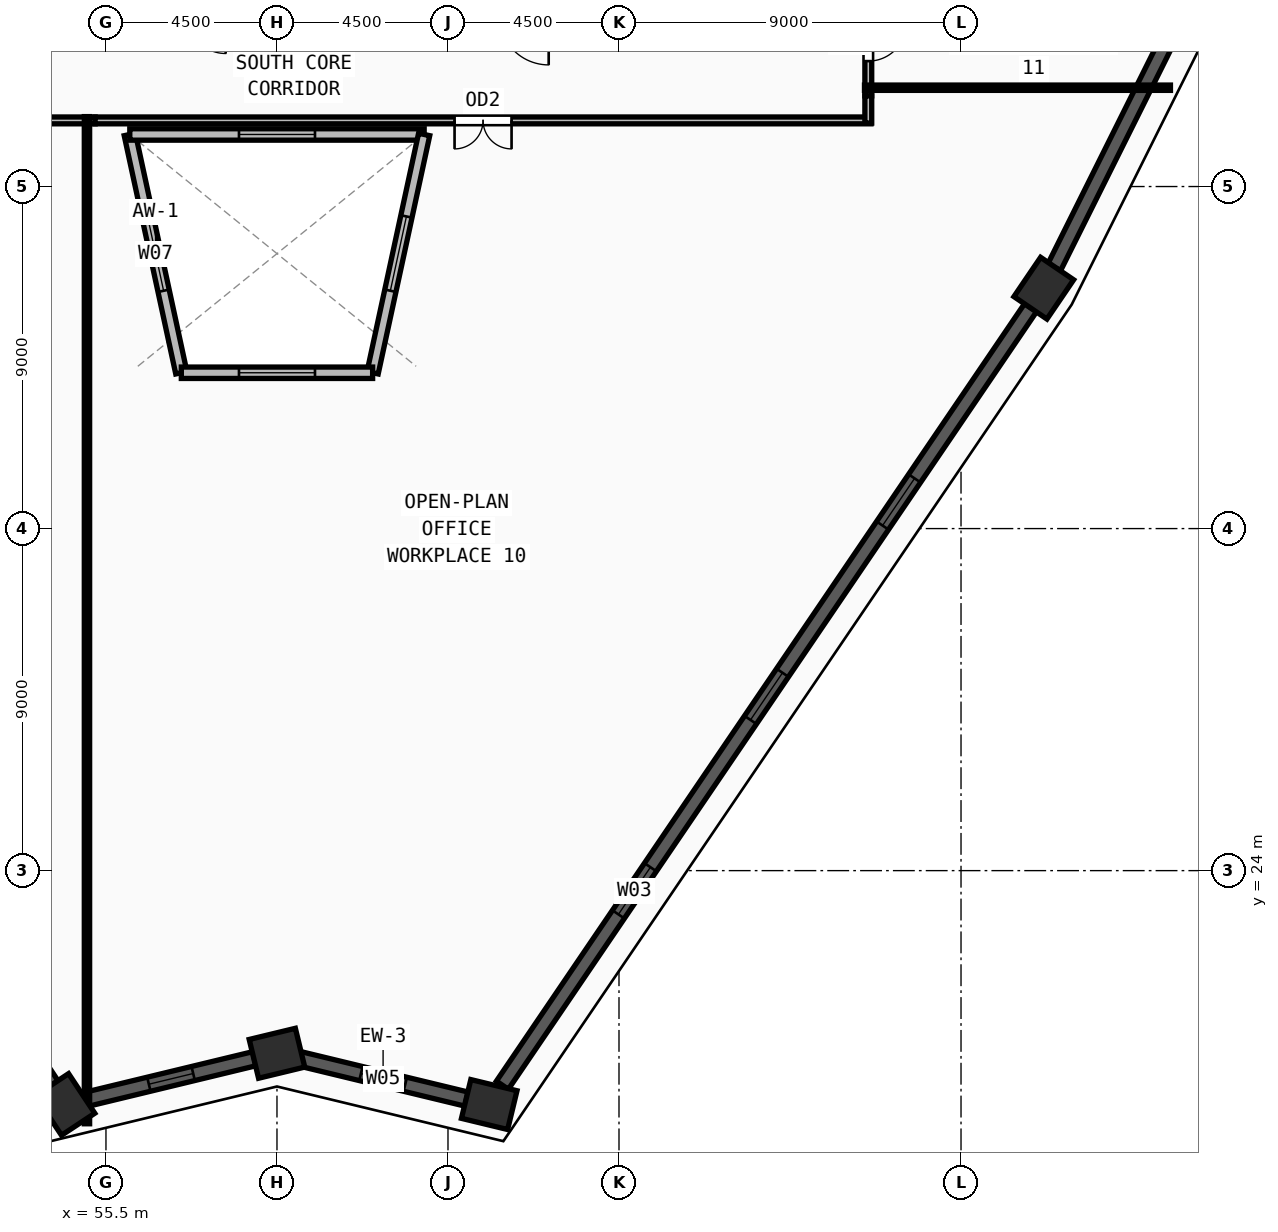
"""IFC4 building model, lengths in metres.
Left out: names, types, materials, properties, quantities, classifications, styles, units other than length and angle.
Written with IfcOpenShell. Run it as: python <this file> out.ifc"""

import sys

from ifc_helpers import new_model, si_unit, direction, frame, frame_2d, origin, origin_2d, place, context, subcontext, project, spatial, rectangle, extrude, source, transform, mapped, element, fill, save


model = new_model("IFC4")
c1 = context("Model", 3, precision=1e-05, world=origin(), true_north=direction((0.0, 1.0)))
c2 = subcontext(c1, "Body", "Model", "MODEL_VIEW")
j1 = project(units=[si_unit("LENGTHUNIT", "METRE"), si_unit("PLANEANGLEUNIT", "RADIAN")], contexts=[c1])
p1 = place(None, origin())
s1 = spatial("IfcSite", under=j1, at=p1, CompositionType="ELEMENT")
p2 = place(p1, origin())
s2 = spatial("IfcBuilding", under=s1, at=p2, CompositionType="ELEMENT")
p3 = place(p2, frame((0.0, 0.0, 194.25)))
s3 = spatial("IfcBuildingStorey", under=s2, at=p3, CompositionType="ELEMENT", Elevation=194.25)
m1 = source(origin(), c2, "Body", "SweptSolid", [
    extrude(rectangle(XDim=1.25, YDim=1.05, at=origin_2d()), origin(), (0.0, 0.0, 1.0), 3.75),
])
for number, where, z_axis, x_axis in (
    (1, (54.423, 17.847, 0.0), (0.0, 0.0, 1.0), (-0.552, 0.834, 0.0)),
    (2, (80.178, 39.325, 0.0), (0.0, 0.0, 1.0), (0.562, 0.827, 0.0)),
    (3, (65.585, 17.845, 0.0), (0.0, 0.0, 1.0), (-0.972, 0.235, 0.0)),
    (4, (60.0, 19.194, 0.0), (0.0, 0.0, 1.0), (0.972, 0.235, 0.0)),
):
    element("IfcColumn", number, at=place(p3, frame(where, z_axis=z_axis, x_axis=x_axis)), inside=s3, PredefinedType="COLUMN", context=c2, shape_type="MappedRepresentation", body=[
        mapped(m1, transform((0.0, 0.0, 0.0), x_axis=(1.0, 0.0, 0.0), y_axis=(0.0, 1.0, 0.0), z_axis=(0.0, 0.0, 1.0), scale=1.0)),
    ])
p4 = place(p3, frame((60.598, 19.05, 0.0), z_axis=(0.0, 0.0, 1.0), x_axis=(0.972002207068, -0.234971720543, 0.0)))
e5 = element("IfcWall", 5, at=p4, inside=s3, PredefinedType="SOLIDWALL", context=c2, shape_type="SweptSolid", body=[
    extrude(rectangle(XDim=4.516, YDim=0.38, at=frame_2d((2.258, 0.0))), origin(), (0.0, 0.0, 1.0), 3.57),
])
m2 = source(origin(), c2, "Body", "SweptSolid", [
    extrude(rectangle(XDim=1.2, YDim=1.9, at=frame_2d((0.6, 0.95))), frame((0.0, 0.2, 0.0), z_axis=(0.0, -1.0, 0.0), x_axis=(1.0, 0.0, 0.0)), (0.0, 0.0, 1.0), 0.4),
])
p5 = place(p4, frame((1.658, 0.0, 0.55)))
e6 = element("IfcOpeningElement", 6, at=p5, cuts=e5, PredefinedType="OPENING", context=c2, shape_type="MappedRepresentation", body=[
    mapped(m2, transform((0.0, 0.0, 0.0), x_axis=(1.0, 0.0, 0.0), y_axis=(0.0, 1.0, 0.0), z_axis=(0.0, 0.0, 1.0), scale=1.0)),
])
p6 = place(p3, frame((65.931, 18.354, 0.0), z_axis=(0.0, 0.0, 1.0), x_axis=(0.561951205554, 0.827170383039, 0.0)))
e7 = element("IfcWall", 7, at=p6, inside=s3, PredefinedType="SOLIDWALL", context=c2, shape_type="SweptSolid", body=[
    extrude(rectangle(XDim=24.737, YDim=0.38, at=frame_2d((12.369, 0.0))), origin(), (0.0, 0.0, 1.0), 3.57),
])
m3 = source(origin(), c2, "Body", "SweptSolid", [
    extrude(rectangle(XDim=1.5, YDim=1.9, at=frame_2d((0.75, 0.95))), frame((0.0, 0.2, 0.0), z_axis=(0.0, -1.0, 0.0), x_axis=(1.0, 0.0, 0.0)), (0.0, 0.0, 1.0), 0.4),
])
p7 = place(p6, frame((5.434, 0.0, 0.55)))
e8 = element("IfcOpeningElement", 8, at=p7, cuts=e7, PredefinedType="OPENING", context=c2, shape_type="MappedRepresentation", body=[
    mapped(m3, transform((0.0, 0.0, 0.0), x_axis=(1.0, 0.0, 0.0), y_axis=(0.0, 1.0, 0.0), z_axis=(0.0, 0.0, 1.0), scale=1.0)),
])
p8 = place(p6, frame((11.619, 0.0, 0.55)))
e9 = element("IfcOpeningElement", 9, at=p8, cuts=e7, PredefinedType="OPENING", context=c2, shape_type="MappedRepresentation", body=[
    mapped(m3, transform((0.0, 0.0, 0.0), x_axis=(1.0, 0.0, 0.0), y_axis=(0.0, 1.0, 0.0), z_axis=(0.0, 0.0, 1.0), scale=1.0)),
])
p9 = place(p6, frame((17.803, 0.0, 0.55)))
e10 = element("IfcOpeningElement", 10, at=p9, cuts=e7, PredefinedType="OPENING", context=c2, shape_type="MappedRepresentation", body=[
    mapped(m3, transform((0.0, 0.0, 0.0), x_axis=(1.0, 0.0, 0.0), y_axis=(0.0, 1.0, 0.0), z_axis=(0.0, 0.0, 1.0), scale=1.0)),
])
p10 = place(p3, frame((80.452, 39.875, 0.0), z_axis=(0.0, 0.0, 1.0), x_axis=(0.446173861236, 0.894946303166, 0.0)))
e11 = element("IfcWall", 11, at=p10, inside=s3, PredefinedType="SOLIDWALL", context=c2, shape_type="SweptSolid", body=[
    extrude(rectangle(XDim=29.97, YDim=0.38, at=frame_2d((14.985, 0.0))), origin(), (0.0, 0.0, 1.0), 3.57),
])
p11 = place(p10, frame((8.943, 0.0, 0.55)))
e12 = element("IfcOpeningElement", 12, at=p11, cuts=e11, PredefinedType="OPENING", context=c2, shape_type="MappedRepresentation", body=[
    mapped(m3, transform((0.0, 0.0, 0.0), x_axis=(1.0, 0.0, 0.0), y_axis=(0.0, 1.0, 0.0), z_axis=(0.0, 0.0, 1.0), scale=1.0)),
])
p12 = place(p10, frame((14.235, 0.0, 0.55)))
e13 = element("IfcOpeningElement", 13, at=p12, cuts=e11, PredefinedType="OPENING", context=c2, shape_type="MappedRepresentation", body=[
    mapped(m3, transform((0.0, 0.0, 0.0), x_axis=(1.0, 0.0, 0.0), y_axis=(0.0, 1.0, 0.0), z_axis=(0.0, 0.0, 1.0), scale=1.0)),
])
p13 = place(p10, frame((21.728, 0.0, 0.55)))
e14 = element("IfcOpeningElement", 14, at=p13, cuts=e11, PredefinedType="OPENING", context=c2, shape_type="MappedRepresentation", body=[
    mapped(m3, transform((0.0, 0.0, 0.0), x_axis=(1.0, 0.0, 0.0), y_axis=(0.0, 1.0, 0.0), z_axis=(0.0, 0.0, 1.0), scale=1.0)),
])
p14 = place(p3, frame((37.541, 43.351, 0.0), z_axis=(0.0, 0.0, 1.0), x_axis=(0.551978948994, -0.833858045394, 0.0)))
e15 = element("IfcWall", 15, at=p14, inside=s3, PredefinedType="SOLIDWALL", context=c2, shape_type="SweptSolid", body=[
    extrude(rectangle(XDim=29.97, YDim=0.38, at=frame_2d((14.985, 0.0))), origin(), (0.0, 0.0, 1.0), 3.57),
])
p15 = place(p14, frame((6.743, 0.0, 0.55)))
e16 = element("IfcOpeningElement", 16, at=p15, cuts=e15, PredefinedType="OPENING", context=c2, shape_type="MappedRepresentation", body=[
    mapped(m3, transform((0.0, 0.0, 0.0), x_axis=(1.0, 0.0, 0.0), y_axis=(0.0, 1.0, 0.0), z_axis=(0.0, 0.0, 1.0), scale=1.0)),
])
p16 = place(p14, frame((14.235, 0.0, 0.55)))
e17 = element("IfcOpeningElement", 17, at=p16, cuts=e15, PredefinedType="OPENING", context=c2, shape_type="MappedRepresentation", body=[
    mapped(m3, transform((0.0, 0.0, 0.0), x_axis=(1.0, 0.0, 0.0), y_axis=(0.0, 1.0, 0.0), z_axis=(0.0, 0.0, 1.0), scale=1.0)),
])
p17 = place(p14, frame((21.728, 0.0, 0.55)))
e18 = element("IfcOpeningElement", 18, at=p17, cuts=e15, PredefinedType="OPENING", context=c2, shape_type="MappedRepresentation", body=[
    mapped(m3, transform((0.0, 0.0, 0.0), x_axis=(1.0, 0.0, 0.0), y_axis=(0.0, 1.0, 0.0), z_axis=(0.0, 0.0, 1.0), scale=1.0)),
])
p18 = place(p3, frame((55.021, 17.991, 0.0), z_axis=(0.0, 0.0, 1.0), x_axis=(0.972002486445, 0.234970564848, 0.0)))
e19 = element("IfcWall", 19, at=p18, inside=s3, PredefinedType="SOLIDWALL", context=c2, shape_type="SweptSolid", body=[
    extrude(rectangle(XDim=4.507, YDim=0.38, at=frame_2d((2.254, 0.0))), origin(), (0.0, 0.0, 1.0), 3.57),
])
p19 = place(p18, frame((1.654, 0.0, 0.55)))
e20 = element("IfcOpeningElement", 20, at=p19, cuts=e19, PredefinedType="OPENING", context=c2, shape_type="MappedRepresentation", body=[
    mapped(m2, transform((0.0, 0.0, 0.0), x_axis=(1.0, 0.0, 0.0), y_axis=(0.0, 1.0, 0.0), z_axis=(0.0, 0.0, 1.0), scale=1.0)),
])
p20 = place(p3, frame((57.483, 37.1, 0.0), z_axis=(0.0, 0.0, 1.0), x_axis=(-0.211374063876, 0.977405240993, 0.0)))
e21 = element("IfcWall", 21, at=p20, inside=s3, PredefinedType="SOLIDWALL", context=c2, shape_type="SweptSolid", body=[
    extrude(rectangle(XDim=6.415, YDim=0.3, at=frame_2d((3.208, 0.0))), origin(), (0.0, 0.0, 1.0), 3.57),
])
m4 = source(origin(), c2, "Body", "SweptSolid", [
    extrude(rectangle(XDim=2.0, YDim=1.9, at=frame_2d((1.0, 0.95))), frame((0.0, 0.16, 0.0), z_axis=(0.0, -1.0, 0.0), x_axis=(1.0, 0.0, 0.0)), (0.0, 0.0, 1.0), 0.32),
])
p21 = place(p20, frame((2.207, 0.0, 0.55)))
e22 = element("IfcOpeningElement", 22, at=p21, cuts=e21, PredefinedType="OPENING", context=c2, shape_type="MappedRepresentation", body=[
    mapped(m4, transform((0.0, 0.0, 0.0), x_axis=(1.0, 0.0, 0.0), y_axis=(0.0, 1.0, 0.0), z_axis=(0.0, 0.0, 1.0), scale=1.0)),
])
p22 = place(p3, frame((56.127, 43.37, 0.0), z_axis=(0.0, 0.0, 1.0), x_axis=(1.0, 0.0, 0.0)))
e23 = element("IfcWall", 23, at=p22, inside=s3, PredefinedType="SOLIDWALL", context=c2, shape_type="SweptSolid", body=[
    extrude(rectangle(XDim=7.746, YDim=0.3, at=frame_2d((3.873, 0.0))), origin(), (0.0, 0.0, 1.0), 3.57),
])
p23 = place(p22, frame((2.873, 0.0, 0.55)))
e24 = element("IfcOpeningElement", 24, at=p23, cuts=e23, PredefinedType="OPENING", context=c2, shape_type="MappedRepresentation", body=[
    mapped(m4, transform((0.0, 0.0, 0.0), x_axis=(1.0, 0.0, 0.0), y_axis=(0.0, 1.0, 0.0), z_axis=(0.0, 0.0, 1.0), scale=1.0)),
])
p24 = place(p3, frame((63.873, 43.37, 0.0), z_axis=(0.0, 0.0, 1.0), x_axis=(-0.211374063876, -0.977405240993, 0.0)))
e25 = element("IfcWall", 25, at=p24, inside=s3, PredefinedType="SOLIDWALL", context=c2, shape_type="SweptSolid", body=[
    extrude(rectangle(XDim=6.415, YDim=0.3, at=frame_2d((3.208, 0.0))), origin(), (0.0, 0.0, 1.0), 3.57),
])
p25 = place(p24, frame((2.207, 0.0, 0.55)))
e26 = element("IfcOpeningElement", 26, at=p25, cuts=e25, PredefinedType="OPENING", context=c2, shape_type="MappedRepresentation", body=[
    mapped(m4, transform((0.0, 0.0, 0.0), x_axis=(1.0, 0.0, 0.0), y_axis=(0.0, 1.0, 0.0), z_axis=(0.0, 0.0, 1.0), scale=1.0)),
])
p26 = place(p3, frame((62.517, 37.1, 0.0), z_axis=(0.0, 0.0, 1.0), x_axis=(-1.0, 0.0, 0.0)))
e27 = element("IfcWall", 27, at=p26, inside=s3, PredefinedType="SOLIDWALL", context=c2, shape_type="SweptSolid", body=[
    extrude(rectangle(XDim=5.034, YDim=0.3, at=frame_2d((2.517, 0.0))), origin(), (0.0, 0.0, 1.0), 3.57),
])
p27 = place(p26, frame((1.517, 0.0, 0.55)))
e28 = element("IfcOpeningElement", 28, at=p27, cuts=e27, PredefinedType="OPENING", context=c2, shape_type="MappedRepresentation", body=[
    mapped(m4, transform((0.0, 0.0, 0.0), x_axis=(1.0, 0.0, 0.0), y_axis=(0.0, 1.0, 0.0), z_axis=(0.0, 0.0, 1.0), scale=1.0)),
])
p28 = place(p3, frame((55.215, 43.74, 0.0), z_axis=(0.0, 0.0, 1.0), x_axis=(-1.0, 0.0, 0.0)))
e29 = element("IfcWall", 29, at=p28, inside=s3, PredefinedType="PARTITIONING", context=c2, shape_type="SweptSolid", body=[
    extrude(rectangle(XDim=10.845, YDim=0.18, at=frame_2d((5.422, 0.0))), origin(), (0.0, 0.0, 1.0), 3.57),
])
m5 = source(origin(), c2, "Body", "SweptSolid", [
    extrude(rectangle(XDim=1.5, YDim=2.2, at=frame_2d((0.75, 1.1))), frame((0.0, 0.1, 0.0), z_axis=(0.0, -1.0, 0.0), x_axis=(1.0, 0.0, 0.0)), (0.0, 0.0, 1.0), 0.2),
])
p29 = place(p28, frame((4.673, 0.0, 0.0)))
e30 = element("IfcOpeningElement", 30, at=p29, cuts=e29, PredefinedType="OPENING", context=c2, shape_type="MappedRepresentation", body=[
    mapped(m5, transform((0.0, 0.0, 0.0), x_axis=(1.0, 0.0, 0.0), y_axis=(0.0, 1.0, 0.0), z_axis=(0.0, 0.0, 1.0), scale=1.0)),
])
p30 = place(p3, frame((75.63, 43.74, 0.0), z_axis=(0.0, 0.0, 1.0), x_axis=(-1.0, 0.0, 0.0)))
e31 = element("IfcWall", 31, at=p30, inside=s3, PredefinedType="PARTITIONING", context=c2, shape_type="SweptSolid", body=[
    extrude(rectangle(XDim=20.415, YDim=0.18, at=frame_2d((10.208, 0.0))), origin(), (0.0, 0.0, 1.0), 3.57),
])
p31 = place(p30, frame((9.457, 0.0, 0.0)))
e32 = element("IfcOpeningElement", 32, at=p31, cuts=e31, PredefinedType="OPENING", context=c2, shape_type="MappedRepresentation", body=[
    mapped(m5, transform((0.0, 0.0, 0.0), x_axis=(1.0, 0.0, 0.0), y_axis=(0.0, 1.0, 0.0), z_axis=(0.0, 0.0, 1.0), scale=1.0)),
])
p32 = place(p3, frame((75.56, 47.215, 0.0), z_axis=(0.0, 0.0, 1.0), x_axis=(0.0, -1.0, 0.0)))
e33 = element("IfcWall", 33, at=p32, inside=s3, PredefinedType="PARTITIONING", context=c2, shape_type="SweptSolid", body=[
    extrude(rectangle(XDim=2.83, YDim=0.18, at=frame_2d((1.415, 0.0))), origin(), (0.0, 0.0, 1.0), 3.57),
])
m6 = source(origin(), c2, "Body", "SweptSolid", [
    extrude(rectangle(XDim=1.0, YDim=2.2, at=frame_2d((0.5, 1.1))), frame((0.0, 0.1, 0.0), z_axis=(0.0, -1.0, 0.0), x_axis=(1.0, 0.0, 0.0)), (0.0, 0.0, 1.0), 0.2),
])
p33 = place(p32, frame((0.915, 0.0, 0.0)))
e34 = element("IfcOpeningElement", 34, at=p33, cuts=e33, PredefinedType="OPENING", context=c2, shape_type="MappedRepresentation", body=[
    mapped(m6, transform((0.0, 0.0, 0.0), x_axis=(1.0, 0.0, 0.0), y_axis=(0.0, 1.0, 0.0), z_axis=(0.0, 0.0, 1.0), scale=1.0)),
])
p34 = place(p3, frame((75.56, 44.385, 0.0), z_axis=(0.0, 0.0, 1.0), x_axis=(0.0, -1.0, 0.0)))
e35 = element("IfcWall", 35, at=p34, inside=s3, PredefinedType="PARTITIONING", context=c2, shape_type="SweptSolid", body=[
    extrude(rectangle(XDim=0.715, YDim=0.18, at=frame_2d((0.357, 0.0))), origin(), (0.0, 0.0, 1.0), 3.57),
])
p35 = place(p3, frame((75.46, 44.6, 0.0), z_axis=(0.0, 0.0, 1.0), x_axis=(1.0, 0.0, 0.0)))
e36 = element("IfcWall", 36, at=p35, inside=s3, PredefinedType="PARTITIONING", context=c2, shape_type="SweptSolid", body=[
    extrude(rectangle(XDim=8.051, YDim=0.14, at=frame_2d((4.025, 0.0))), origin(), (0.0, 0.0, 1.0), 3.57),
])
p36 = place(p3, frame((55.0, 43.84, 0.0), z_axis=(0.0, 0.0, 1.0), x_axis=(0.0, -1.0, 0.0)))
e37 = element("IfcWall", 37, at=p36, inside=s3, PredefinedType="PARTITIONING", context=c2, shape_type="SweptSolid", body=[
    extrude(rectangle(XDim=26.501, YDim=0.14, at=frame_2d((13.25, 0.0))), origin(), (0.0, 0.0, 1.0), 3.57),
])
m7 = source(origin(), c2, "Body", "SweptSolid", [
    extrude(rectangle(XDim=1.2, YDim=1.9, at=frame_2d((0.6, 0.95))), frame((0.0, 0.03, 0.0), z_axis=(0.0, -1.0, 0.0), x_axis=(1.0, 0.0, 0.0)), (0.0, 0.0, 1.0), 0.06),
])
p37 = place(p5, origin())
e38 = element("IfcWindow", 38, at=p37, inside=s3, PartitioningType="SINGLE_PANEL", PredefinedType="WINDOW", context=c2, shape_type="MappedRepresentation", body=[
    mapped(m7, transform((0.0, 0.0, 0.0), x_axis=(1.0, 0.0, 0.0), y_axis=(0.0, 1.0, 0.0), z_axis=(0.0, 0.0, 1.0), scale=1.0)),
])
fill(e6, e38)
m8 = source(origin(), c2, "Body", "SweptSolid", [
    extrude(rectangle(XDim=1.5, YDim=1.9, at=frame_2d((0.75, 0.95))), frame((0.0, 0.03, 0.0), z_axis=(0.0, -1.0, 0.0), x_axis=(1.0, 0.0, 0.0)), (0.0, 0.0, 1.0), 0.06),
])
p38 = place(p7, origin())
e39 = element("IfcWindow", 39, at=p38, inside=s3, PartitioningType="DOUBLE_PANEL_VERTICAL", PredefinedType="WINDOW", context=c2, shape_type="MappedRepresentation", body=[
    mapped(m8, transform((0.0, 0.0, 0.0), x_axis=(1.0, 0.0, 0.0), y_axis=(0.0, 1.0, 0.0), z_axis=(0.0, 0.0, 1.0), scale=1.0)),
])
fill(e8, e39)
p39 = place(p8, origin())
e40 = element("IfcWindow", 40, at=p39, inside=s3, PartitioningType="DOUBLE_PANEL_VERTICAL", PredefinedType="WINDOW", context=c2, shape_type="MappedRepresentation", body=[
    mapped(m8, transform((0.0, 0.0, 0.0), x_axis=(1.0, 0.0, 0.0), y_axis=(0.0, 1.0, 0.0), z_axis=(0.0, 0.0, 1.0), scale=1.0)),
])
fill(e9, e40)
p40 = place(p9, origin())
e41 = element("IfcWindow", 41, at=p40, inside=s3, PartitioningType="DOUBLE_PANEL_VERTICAL", PredefinedType="WINDOW", context=c2, shape_type="MappedRepresentation", body=[
    mapped(m8, transform((0.0, 0.0, 0.0), x_axis=(1.0, 0.0, 0.0), y_axis=(0.0, 1.0, 0.0), z_axis=(0.0, 0.0, 1.0), scale=1.0)),
])
fill(e10, e41)
p41 = place(p19, origin())
e42 = element("IfcWindow", 42, at=p41, inside=s3, PartitioningType="SINGLE_PANEL", PredefinedType="WINDOW", context=c2, shape_type="MappedRepresentation", body=[
    mapped(m7, transform((0.0, 0.0, 0.0), x_axis=(1.0, 0.0, 0.0), y_axis=(0.0, 1.0, 0.0), z_axis=(0.0, 0.0, 1.0), scale=1.0)),
])
fill(e20, e42)
m9 = source(origin(), c2, "Body", "SweptSolid", [
    extrude(rectangle(XDim=2.0, YDim=1.9, at=frame_2d((1.0, 0.95))), frame((0.0, 0.03, 0.0), z_axis=(0.0, -1.0, 0.0), x_axis=(1.0, 0.0, 0.0)), (0.0, 0.0, 1.0), 0.06),
])
p42 = place(p21, origin())
e43 = element("IfcWindow", 43, at=p42, inside=s3, PartitioningType="DOUBLE_PANEL_VERTICAL", PredefinedType="WINDOW", context=c2, shape_type="MappedRepresentation", body=[
    mapped(m9, transform((0.0, 0.0, 0.0), x_axis=(1.0, 0.0, 0.0), y_axis=(0.0, 1.0, 0.0), z_axis=(0.0, 0.0, 1.0), scale=1.0)),
])
fill(e22, e43)
p43 = place(p23, origin())
e44 = element("IfcWindow", 44, at=p43, inside=s3, PartitioningType="DOUBLE_PANEL_VERTICAL", PredefinedType="WINDOW", context=c2, shape_type="MappedRepresentation", body=[
    mapped(m9, transform((0.0, 0.0, 0.0), x_axis=(1.0, 0.0, 0.0), y_axis=(0.0, 1.0, 0.0), z_axis=(0.0, 0.0, 1.0), scale=1.0)),
])
fill(e24, e44)
p44 = place(p25, origin())
e45 = element("IfcWindow", 45, at=p44, inside=s3, PartitioningType="DOUBLE_PANEL_VERTICAL", PredefinedType="WINDOW", context=c2, shape_type="MappedRepresentation", body=[
    mapped(m9, transform((0.0, 0.0, 0.0), x_axis=(1.0, 0.0, 0.0), y_axis=(0.0, 1.0, 0.0), z_axis=(0.0, 0.0, 1.0), scale=1.0)),
])
fill(e26, e45)
p45 = place(p27, origin())
e46 = element("IfcWindow", 46, at=p45, inside=s3, PartitioningType="DOUBLE_PANEL_VERTICAL", PredefinedType="WINDOW", context=c2, shape_type="MappedRepresentation", body=[
    mapped(m9, transform((0.0, 0.0, 0.0), x_axis=(1.0, 0.0, 0.0), y_axis=(0.0, 1.0, 0.0), z_axis=(0.0, 0.0, 1.0), scale=1.0)),
])
fill(e28, e46)
m10 = source(origin(), c2, "Body", "SweptSolid", [
    extrude(rectangle(XDim=1.5, YDim=2.2, at=frame_2d((0.75, 1.1))), frame((0.0, 0.025, 0.0), z_axis=(0.0, -1.0, 0.0), x_axis=(1.0, 0.0, 0.0)), (0.0, 0.0, 1.0), 0.05),
])
p46 = place(p31, origin())
e47 = element("IfcDoor", 47, at=p46, inside=s3, OperationType="DOUBLE_DOOR_SINGLE_SWING", PredefinedType="DOOR", context=c2, shape_type="MappedRepresentation", body=[
    mapped(m10, transform((0.0, 0.0, 0.0), x_axis=(1.0, 0.0, 0.0), y_axis=(0.0, 1.0, 0.0), z_axis=(0.0, 0.0, 1.0), scale=1.0)),
])
fill(e32, e47)
m11 = source(origin(), c2, "Body", "SweptSolid", [
    extrude(rectangle(XDim=1.0, YDim=2.2, at=frame_2d((0.5, 1.1))), frame((0.0, 0.025, 0.0), z_axis=(0.0, -1.0, 0.0), x_axis=(1.0, 0.0, 0.0)), (0.0, 0.0, 1.0), 0.05),
])
p47 = place(p33, origin())
e48 = element("IfcDoor", 48, at=p47, inside=s3, OperationType="SINGLE_SWING_LEFT", PredefinedType="DOOR", context=c2, shape_type="MappedRepresentation", body=[
    mapped(m11, transform((0.0, 0.0, 0.0), x_axis=(1.0, 0.0, 0.0), y_axis=(0.0, 1.0, 0.0), z_axis=(0.0, 0.0, 1.0), scale=1.0)),
])
fill(e34, e48)
save(model, sys.argv[1])
